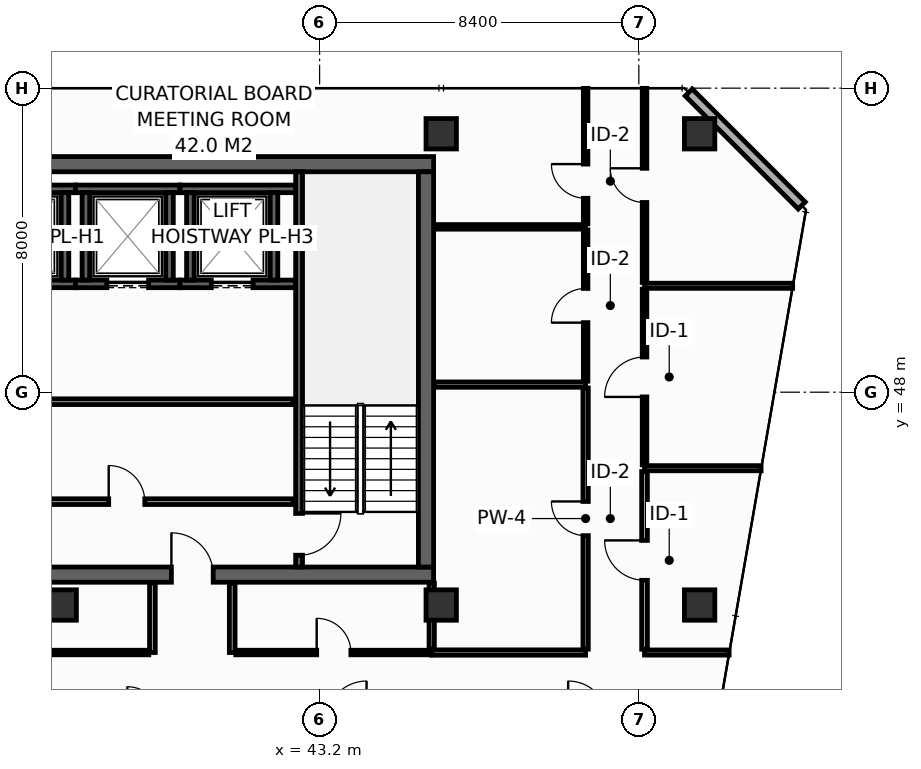
"""IFC4 building model, lengths in metres.
Left out: names, types, materials, properties, quantities, classifications, styles, units other than length and angle.
Written with IfcOpenShell. Run it as: python <this file> out.ifc"""

import sys

from ifc_helpers import new_model, si_unit, direction, frame, frame_2d, origin, origin_2d, place, context, subcontext, project, spatial, rectangle, hollow_rectangle, extrude, element, fill, save


model = new_model("IFC4")
c1 = context("Model", 3, precision=1e-05, world=origin(), true_north=direction((0.0, 1.0)))
c2 = subcontext(c1, "Body", "Model", "MODEL_VIEW")
j1 = project(units=[si_unit("LENGTHUNIT", "METRE"), si_unit("PLANEANGLEUNIT", "RADIAN")], contexts=[c1])
p1 = place(None, origin())
s1 = spatial("IfcSite", under=j1, at=p1, CompositionType="ELEMENT")
p2 = place(p1, origin())
s2 = spatial("IfcBuilding", under=s1, at=p2, CompositionType="ELEMENT")
p3 = place(p2, frame((0.0, 0.0, 242.0)))
s3 = spatial("IfcBuildingStorey", under=s2, at=p3, CompositionType="ELEMENT", Elevation=242.0)
p4 = place(p3, frame((13.7, 43.2, 0.0), z_axis=(0.0, 0.0, 1.0), x_axis=(1.0, 0.0, 0.0)))
e1 = element("IfcWall", 1, at=p4, inside=s3, PredefinedType="SHEAR", context=c2, shape_type="SweptSolid", body=[
    extrude(rectangle(XDim=32.5, YDim=0.4, at=frame_2d((16.25, 0.0))), origin(), (0.0, 0.0, 1.0), 3.55),
])
p5 = place(p4, frame((5.4, 0.0, 0.0)))
e2 = element("IfcOpeningElement", 2, at=p5, cuts=e1, PredefinedType="OPENING", context=c2, shape_type="SweptSolid", body=[
    extrude(rectangle(XDim=1.1, YDim=2.15, at=frame_2d((0.55, 1.075))), frame((0.0, 0.21, 0.0), z_axis=(0.0, -1.0, 0.0), x_axis=(1.0, 0.0, 0.0)), (0.0, 0.0, 1.0), 0.42),
])
p6 = place(p4, frame((25.6, 0.0, 0.0)))
e3 = element("IfcOpeningElement", 3, at=p6, cuts=e1, PredefinedType="OPENING", context=c2, shape_type="SweptSolid", body=[
    extrude(rectangle(XDim=1.1, YDim=2.15, at=frame_2d((0.55, 1.075))), frame((0.0, 0.21, 0.0), z_axis=(0.0, -1.0, 0.0), x_axis=(1.0, 0.0, 0.0)), (0.0, 0.0, 1.0), 0.42),
])
p7 = place(p3, frame((13.7, 54.0, 0.0), z_axis=(0.0, 0.0, 1.0), x_axis=(1.0, 0.0, 0.0)))
e4 = element("IfcWall", 4, at=p7, inside=s3, PredefinedType="SHEAR", context=c2, shape_type="SweptSolid", body=[
    extrude(rectangle(XDim=32.5, YDim=0.4, at=frame_2d((16.25, 0.0))), origin(), (0.0, 0.0, 1.0), 3.55),
])
p8 = place(p3, frame((46.0, 43.4, 0.0), z_axis=(0.0, 0.0, 1.0), x_axis=(0.0, 1.0, 0.0)))
e5 = element("IfcWall", 5, at=p8, inside=s3, PredefinedType="SHEAR", context=c2, shape_type="SweptSolid", body=[
    extrude(rectangle(XDim=10.4, YDim=0.4, at=frame_2d((5.2, 0.0))), origin(), (0.0, 0.0, 1.0), 3.55),
])
for number, where, z_axis, x_axis in (
    (6, (46.4, 54.8, 0.0), (0.0, 0.0, 1.0), (1.0, 0.0, 0.0)),
    (7, (53.2, 54.8, 0.0), (0.0, 0.0, 1.0), (1.0, 0.0, 0.0)),
    (8, (36.4, 42.4, 0.0), (0.0, 0.0, 1.0), (1.0, 0.0, 0.0)),
    (9, (46.4, 42.4, 0.0), (0.0, 0.0, 1.0), (1.0, 0.0, 0.0)),
    (10, (53.2, 42.4, 0.0), (0.0, 0.0, 1.0), (1.0, 0.0, 0.0)),
):
    element("IfcColumn", number, at=place(p3, frame(where, z_axis=z_axis, x_axis=x_axis)), inside=s3, PredefinedType="COLUMN", context=c2, shape_type="SweptSolid", body=[
        extrude(hollow_rectangle(XDim=0.8, YDim=0.8, WallThickness=0.036, at=origin_2d()), origin(), (0.0, 0.0, 1.0), 3.8),
    ])
p9 = place(p3, frame((34.2, 50.85, 0.0), z_axis=(0.0, 0.0, 1.0), x_axis=(1.0, 0.0, 0.0)))
e11 = element("IfcWall", 11, at=p9, inside=s3, PredefinedType="SHEAR", context=c2, shape_type="SweptSolid", body=[
    extrude(rectangle(XDim=2.575, YDim=0.2, at=frame_2d((1.288, 0.0))), origin(), (0.0, 0.0, 1.0), 3.55),
])
p10 = place(p9, frame((0.65, 0.0, 0.0)))
e12 = element("IfcOpeningElement", 12, at=p10, cuts=e11, PredefinedType="OPENING", context=c2, shape_type="SweptSolid", body=[
    extrude(rectangle(XDim=1.1, YDim=2.2, at=frame_2d((0.55, 1.1))), frame((0.0, 0.11, 0.0), z_axis=(0.0, -1.0, 0.0), x_axis=(1.0, 0.0, 0.0)), (0.0, 0.0, 1.0), 0.22),
])
p11 = place(p3, frame((34.2, 53.35, 0.0), z_axis=(0.0, 0.0, 1.0), x_axis=(1.0, 0.0, 0.0)))
e13 = element("IfcWall", 13, at=p11, inside=s3, PredefinedType="SHEAR", context=c2, shape_type="SweptSolid", body=[
    extrude(rectangle(XDim=2.575, YDim=0.2, at=frame_2d((1.288, 0.0))), origin(), (0.0, 0.0, 1.0), 3.55),
])
p12 = place(p3, frame((36.5, 50.95, 0.0), z_axis=(0.0, 0.0, 1.0), x_axis=(0.0, 1.0, 0.0)))
e14 = element("IfcWall", 14, at=p12, inside=s3, PredefinedType="SHEAR", context=c2, shape_type="SweptSolid", body=[
    extrude(rectangle(XDim=2.3, YDim=0.2, at=frame_2d((1.15, 0.0))), origin(), (0.0, 0.0, 1.0), 3.55),
])
p13 = place(p3, frame((36.775, 50.85, 0.0), z_axis=(0.0, 0.0, 1.0), x_axis=(1.0, 0.0, 0.0)))
e15 = element("IfcWall", 15, at=p13, inside=s3, PredefinedType="SHEAR", context=c2, shape_type="SweptSolid", body=[
    extrude(rectangle(XDim=2.75, YDim=0.2, at=frame_2d((1.375, 0.0))), origin(), (0.0, 0.0, 1.0), 3.55),
])
p14 = place(p13, frame((0.825, 0.0, 0.0)))
e16 = element("IfcOpeningElement", 16, at=p14, cuts=e15, PredefinedType="OPENING", context=c2, shape_type="SweptSolid", body=[
    extrude(rectangle(XDim=1.1, YDim=2.2, at=frame_2d((0.55, 1.1))), frame((0.0, 0.11, 0.0), z_axis=(0.0, -1.0, 0.0), x_axis=(1.0, 0.0, 0.0)), (0.0, 0.0, 1.0), 0.22),
])
p15 = place(p3, frame((36.775, 53.35, 0.0), z_axis=(0.0, 0.0, 1.0), x_axis=(1.0, 0.0, 0.0)))
e17 = element("IfcWall", 17, at=p15, inside=s3, PredefinedType="SHEAR", context=c2, shape_type="SweptSolid", body=[
    extrude(rectangle(XDim=2.75, YDim=0.2, at=frame_2d((1.375, 0.0))), origin(), (0.0, 0.0, 1.0), 3.55),
])
for number, where, z_axis, x_axis in (
    (18, (37.05, 50.95, 0.0), (0.0, 0.0, 1.0), (0.0, 1.0, 0.0)),
    (19, (39.25, 50.95, 0.0), (0.0, 0.0, 1.0), (0.0, 1.0, 0.0)),
):
    element("IfcWall", number, at=place(p3, frame(where, z_axis=z_axis, x_axis=x_axis)), inside=s3, PredefinedType="SHEAR", context=c2, shape_type="SweptSolid", body=[
        extrude(rectangle(XDim=2.3, YDim=0.2, at=frame_2d((1.15, 0.0))), origin(), (0.0, 0.0, 1.0), 3.55),
    ])
p16 = place(p3, frame((39.525, 50.85, 0.0), z_axis=(0.0, 0.0, 1.0), x_axis=(1.0, 0.0, 0.0)))
e20 = element("IfcWall", 20, at=p16, inside=s3, PredefinedType="SHEAR", context=c2, shape_type="SweptSolid", body=[
    extrude(rectangle(XDim=3.045, YDim=0.2, at=frame_2d((1.522, 0.0))), origin(), (0.0, 0.0, 1.0), 3.55),
])
p17 = place(p16, frame((0.825, 0.0, 0.0)))
e21 = element("IfcOpeningElement", 21, at=p17, cuts=e20, PredefinedType="OPENING", context=c2, shape_type="SweptSolid", body=[
    extrude(rectangle(XDim=1.1, YDim=2.2, at=frame_2d((0.55, 1.1))), frame((0.0, 0.11, 0.0), z_axis=(0.0, -1.0, 0.0), x_axis=(1.0, 0.0, 0.0)), (0.0, 0.0, 1.0), 0.22),
])
p18 = place(p3, frame((39.525, 53.35, 0.0), z_axis=(0.0, 0.0, 1.0), x_axis=(1.0, 0.0, 0.0)))
e22 = element("IfcWall", 22, at=p18, inside=s3, PredefinedType="SHEAR", context=c2, shape_type="SweptSolid", body=[
    extrude(rectangle(XDim=3.045, YDim=0.2, at=frame_2d((1.522, 0.0))), origin(), (0.0, 0.0, 1.0), 3.55),
])
for number, where, z_axis, x_axis in (
    (23, (39.8, 50.95, 0.0), (0.0, 0.0, 1.0), (0.0, 1.0, 0.0)),
    (24, (42.0, 50.95, 0.0), (0.0, 0.0, 1.0), (0.0, 1.0, 0.0)),
):
    element("IfcWall", number, at=place(p3, frame(where, z_axis=z_axis, x_axis=x_axis)), inside=s3, PredefinedType="SHEAR", context=c2, shape_type="SweptSolid", body=[
        extrude(rectangle(XDim=2.3, YDim=0.2, at=frame_2d((1.15, 0.0))), origin(), (0.0, 0.0, 1.0), 3.55),
    ])
p19 = place(p3, frame((42.66, 53.8, 0.0), z_axis=(0.0, 0.0, 1.0), x_axis=(0.0, -1.0, 0.0)))
e25 = element("IfcWall", 25, at=p19, inside=s3, PredefinedType="SHEAR", context=c2, shape_type="SweptSolid", body=[
    extrude(rectangle(XDim=10.4, YDim=0.18, at=frame_2d((5.2, 0.0))), origin(), (0.0, 0.0, 1.0), 3.55),
])
p20 = place(p19, frame((8.99, 0.0, 0.0)))
e26 = element("IfcOpeningElement", 26, at=p20, cuts=e25, PredefinedType="OPENING", context=c2, shape_type="SweptSolid", body=[
    extrude(rectangle(XDim=1.1, YDim=2.15, at=frame_2d((0.55, 1.075))), frame((0.0, 0.1, 0.0), z_axis=(0.0, -1.0, 0.0), x_axis=(1.0, 0.0, 0.0)), (0.0, 0.0, 1.0), 0.2),
])
p21 = place(p3, frame((34.05, 45.12, 0.0), z_axis=(0.0, 0.0, 1.0), x_axis=(1.0, 0.0, 0.0)))
e27 = element("IfcWall", 27, at=p21, inside=s3, PredefinedType="PARTITIONING", context=c2, shape_type="SweptSolid", body=[
    extrude(rectangle(XDim=8.45, YDim=0.15, at=frame_2d((4.225, 0.0))), origin(), (0.0, 0.0, 1.0), 3.55),
])
p22 = place(p21, frame((3.6, 0.0, 0.0)))
e28 = element("IfcOpeningElement", 28, at=p22, cuts=e27, PredefinedType="OPENING", context=c2, shape_type="SweptSolid", body=[
    extrude(rectangle(XDim=0.95, YDim=2.15, at=frame_2d((0.475, 1.075))), frame((0.0, 0.085, 0.0), z_axis=(0.0, -1.0, 0.0), x_axis=(1.0, 0.0, 0.0)), (0.0, 0.0, 1.0), 0.17),
])
p23 = place(p3, frame((34.05, 47.75, 0.0), z_axis=(0.0, 0.0, 1.0), x_axis=(1.0, 0.0, 0.0)))
e29 = element("IfcWall", 29, at=p23, inside=s3, PredefinedType="PARTITIONING", context=c2, shape_type="SweptSolid", body=[
    extrude(rectangle(XDim=8.45, YDim=0.15, at=frame_2d((4.225, 0.0))), origin(), (0.0, 0.0, 1.0), 3.55),
])
p24 = place(p3, frame((55.887, 52.913, 0.0), z_axis=(0.0, 0.0, 1.0), x_axis=(-0.707106781187, 0.707106781187, 0.0)))
e30 = element("IfcWall", 30, at=p24, inside=s3, PredefinedType="STANDARD", context=c2, shape_type="SweptSolid", body=[
    extrude(rectangle(XDim=4.206, YDim=0.26, at=frame_2d((2.103, 0.0))), origin(), (0.0, 0.0, 1.0), 3.55),
])
p25 = place(p3, frame((46.15, 41.15, 0.0), z_axis=(0.0, 0.0, 1.0), x_axis=(1.0, 0.0, 0.0)))
e31 = element("IfcWall", 31, at=p25, inside=s3, PredefinedType="PARTITIONING", context=c2, shape_type="SweptSolid", body=[
    extrude(rectangle(XDim=4.05, YDim=0.14, at=frame_2d((2.025, 0.0))), origin(), (0.0, 0.0, 1.0), 3.55),
])
p26 = place(p3, frame((46.15, 41.24, 0.0), z_axis=(0.0, 0.0, 1.0), x_axis=(0.0, 1.0, 0.0)))
e32 = element("IfcWall", 32, at=p26, inside=s3, PredefinedType="PARTITIONING", context=c2, shape_type="SweptSolid", body=[
    extrude(rectangle(XDim=1.74, YDim=0.14, at=frame_2d((0.87, 0.0))), origin(), (0.0, 0.0, 1.0), 3.55),
])
p27 = place(p3, frame((46.22, 48.2, 0.0), z_axis=(0.0, 0.0, 1.0), x_axis=(1.0, 0.0, 0.0)))
e33 = element("IfcWall", 33, at=p27, inside=s3, PredefinedType="PARTITIONING", context=c2, shape_type="SweptSolid", body=[
    extrude(rectangle(XDim=3.98, YDim=0.14, at=frame_2d((1.99, 0.0))), origin(), (0.0, 0.0, 1.0), 3.55),
])
p28 = place(p3, frame((50.2, 41.24, 0.0), z_axis=(0.0, 0.0, 1.0), x_axis=(0.0, 1.0, 0.0)))
e34 = element("IfcWall", 34, at=p28, inside=s3, PredefinedType="PARTITIONING", context=c2, shape_type="SweptSolid", body=[
    extrude(rectangle(XDim=6.87, YDim=0.14, at=frame_2d((3.435, 0.0))), origin(), (0.0, 0.0, 1.0), 2.947),
])
p29 = place(p28, frame((2.985, 0.0, 0.0)))
e35 = element("IfcOpeningElement", 35, at=p29, cuts=e34, PredefinedType="OPENING", context=c2, shape_type="SweptSolid", body=[
    extrude(rectangle(XDim=0.9, YDim=2.1, at=frame_2d((0.45, 1.05))), frame((0.0, 0.08, 0.0), z_axis=(0.0, -1.0, 0.0), x_axis=(1.0, 0.0, 0.0)), (0.0, 0.0, 1.0), 0.16),
])
p30 = place(p3, frame((46.22, 52.35, 0.0), z_axis=(0.0, 0.0, 1.0), x_axis=(1.0, 0.0, 0.0)))
e36 = element("IfcWall", 36, at=p30, inside=s3, PredefinedType="PARTITIONING", context=c2, shape_type="SweptSolid", body=[
    extrude(rectangle(XDim=3.98, YDim=0.12, at=frame_2d((1.99, 0.0))), origin(), (0.0, 0.0, 1.0), 3.55),
])
p31 = place(p3, frame((50.2, 48.29, 0.0), z_axis=(0.0, 0.0, 1.0), x_axis=(0.0, 1.0, 0.0)))
e37 = element("IfcWall", 37, at=p31, inside=s3, PredefinedType="PARTITIONING", context=c2, shape_type="SweptSolid", body=[
    extrude(rectangle(XDim=3.98, YDim=0.12, at=frame_2d((1.99, 0.0))), origin(), (0.0, 0.0, 1.0), 3.55),
])
p32 = place(p31, frame((1.54, 0.0, 0.0)))
e38 = element("IfcOpeningElement", 38, at=p32, cuts=e37, PredefinedType="OPENING", context=c2, shape_type="SweptSolid", body=[
    extrude(rectangle(XDim=0.9, YDim=2.1, at=frame_2d((0.45, 1.05))), frame((0.0, 0.07, 0.0), z_axis=(0.0, -1.0, 0.0), x_axis=(1.0, 0.0, 0.0)), (0.0, 0.0, 1.0), 0.14),
])
p33 = place(p3, frame((50.2, 52.43, 0.0), z_axis=(0.0, 0.0, 1.0), x_axis=(0.0, 1.0, 0.0)))
e39 = element("IfcWall", 39, at=p33, inside=s3, PredefinedType="PARTITIONING", context=c2, shape_type="SweptSolid", body=[
    extrude(rectangle(XDim=3.565, YDim=0.12, at=frame_2d((1.783, 0.0))), origin(), (0.0, 0.0, 1.0), 2.935),
])
p34 = place(p33, frame((0.672, 0.0, 0.0)))
e40 = element("IfcOpeningElement", 40, at=p34, cuts=e39, PredefinedType="OPENING", context=c2, shape_type="SweptSolid", body=[
    extrude(rectangle(XDim=0.9, YDim=2.1, at=frame_2d((0.45, 1.05))), frame((0.0, 0.07, 0.0), z_axis=(0.0, -1.0, 0.0), x_axis=(1.0, 0.0, 0.0)), (0.0, 0.0, 1.0), 0.14),
])
p35 = place(p3, frame((51.75, 41.15, 0.0), z_axis=(0.0, 0.0, 1.0), x_axis=(1.0, 0.0, 0.0)))
e41 = element("IfcWall", 41, at=p35, inside=s3, PredefinedType="PARTITIONING", context=c2, shape_type="SweptSolid", body=[
    extrude(rectangle(XDim=2.226, YDim=0.135, at=frame_2d((1.113, 0.0))), origin(), (0.0, 0.0, 1.0), 3.085),
])
p36 = place(p3, frame((51.75, 46.0, 0.0), z_axis=(0.0, 0.0, 1.0), x_axis=(1.0, 0.0, 0.0)))
e42 = element("IfcWall", 42, at=p36, inside=s3, PredefinedType="PARTITIONING", context=c2, shape_type="SweptSolid", body=[
    extrude(rectangle(XDim=3.066, YDim=0.135, at=frame_2d((1.533, 0.0))), origin(), (0.0, 0.0, 1.0), 2.947),
])
p37 = place(p3, frame((51.75, 50.8, 0.0), z_axis=(0.0, 0.0, 1.0), x_axis=(1.0, 0.0, 0.0)))
e43 = element("IfcWall", 43, at=p37, inside=s3, PredefinedType="PARTITIONING", context=c2, shape_type="SweptSolid", body=[
    extrude(rectangle(XDim=3.898, YDim=0.135, at=frame_2d((1.949, 0.0))), origin(), (0.0, 0.0, 1.0), 2.947),
])
p38 = place(p3, frame((51.75, 41.238, 0.0), z_axis=(0.0, 0.0, 1.0), x_axis=(0.0, 1.0, 0.0)))
e44 = element("IfcWall", 44, at=p38, inside=s3, PredefinedType="PARTITIONING", context=c2, shape_type="SweptSolid", body=[
    extrude(rectangle(XDim=4.675, YDim=0.15, at=frame_2d((2.337, 0.0))), origin(), (0.0, 0.0, 1.0), 2.947),
])
p39 = place(p38, frame((1.813, 0.0, 0.0)))
e45 = element("IfcOpeningElement", 45, at=p39, cuts=e44, PredefinedType="OPENING", context=c2, shape_type="SweptSolid", body=[
    extrude(rectangle(XDim=1.05, YDim=2.15, at=frame_2d((0.525, 1.075))), frame((0.0, 0.085, 0.0), z_axis=(0.0, -1.0, 0.0), x_axis=(1.0, 0.0, 0.0)), (0.0, 0.0, 1.0), 0.17),
])
p40 = place(p3, frame((51.75, 46.087, 0.0), z_axis=(0.0, 0.0, 1.0), x_axis=(0.0, 1.0, 0.0)))
e46 = element("IfcWall", 46, at=p40, inside=s3, PredefinedType="PARTITIONING", context=c2, shape_type="SweptSolid", body=[
    extrude(rectangle(XDim=4.625, YDim=0.12, at=frame_2d((2.312, 0.0))), origin(), (0.0, 0.0, 1.0), 3.55),
])
p41 = place(p40, frame((1.788, 0.0, 0.0)))
e47 = element("IfcOpeningElement", 47, at=p41, cuts=e46, PredefinedType="OPENING", context=c2, shape_type="SweptSolid", body=[
    extrude(rectangle(XDim=1.05, YDim=2.15, at=frame_2d((0.525, 1.075))), frame((0.0, 0.07, 0.0), z_axis=(0.0, -1.0, 0.0), x_axis=(1.0, 0.0, 0.0)), (0.0, 0.0, 1.0), 0.14),
])
p42 = place(p3, frame((51.75, 50.887, 0.0), z_axis=(0.0, 0.0, 1.0), x_axis=(0.0, 1.0, 0.0)))
e48 = element("IfcWall", 48, at=p42, inside=s3, PredefinedType="PARTITIONING", context=c2, shape_type="SweptSolid", body=[
    extrude(rectangle(XDim=5.108, YDim=0.12, at=frame_2d((2.554, 0.0))), origin(), (0.0, 0.0, 1.0), 2.935),
])
p43 = place(p42, frame((2.104, 0.0, 0.0)))
e49 = element("IfcOpeningElement", 49, at=p43, cuts=e48, PredefinedType="OPENING", context=c2, shape_type="SweptSolid", body=[
    extrude(rectangle(XDim=0.9, YDim=2.1, at=frame_2d((0.45, 1.05))), frame((0.0, 0.07, 0.0), z_axis=(0.0, -1.0, 0.0), x_axis=(1.0, 0.0, 0.0)), (0.0, 0.0, 1.0), 0.14),
])
for number, where, z_axis, x_axis in (
    (50, (38.8, 41.15, 0.0), (0.0, 0.0, 1.0), (0.0, 1.0, 0.0)),
    (51, (40.9, 41.15, 0.0), (0.0, 0.0, 1.0), (0.0, 1.0, 0.0)),
):
    element("IfcWall", number, at=place(p3, frame(where, z_axis=z_axis, x_axis=x_axis)), inside=s3, PredefinedType="PARTITIONING", context=c2, shape_type="SweptSolid", body=[
        extrude(rectangle(XDim=1.83, YDim=0.15, at=frame_2d((0.915, 0.0))), origin(), (0.0, 0.0, 1.0), 3.55),
    ])
p44 = place(p3, frame((20.795, 41.15, 0.0), z_axis=(0.0, 0.0, 1.0), x_axis=(1.0, 0.0, 0.0)))
e52 = element("IfcWall", 52, at=p44, inside=s3, PredefinedType="PARTITIONING", context=c2, shape_type="SweptSolid", body=[
    extrude(rectangle(XDim=17.91, YDim=0.12, at=frame_2d((8.955, 0.0))), origin(), (0.0, 0.0, 1.0), 2.947),
])
p45 = place(p44, frame((8.505, 0.0, 0.0)))
e53 = element("IfcOpeningElement", 53, at=p45, cuts=e52, PredefinedType="OPENING", context=c2, shape_type="SweptSolid", body=[
    extrude(rectangle(XDim=0.9, YDim=2.1, at=frame_2d((0.45, 1.05))), frame((0.0, 0.07, 0.0), z_axis=(0.0, -1.0, 0.0), x_axis=(1.0, 0.0, 0.0)), (0.0, 0.0, 1.0), 0.14),
])
p46 = place(p3, frame((40.995, 41.15, 0.0), z_axis=(0.0, 0.0, 1.0), x_axis=(1.0, 0.0, 0.0)))
e54 = element("IfcWall", 54, at=p46, inside=s3, PredefinedType="PARTITIONING", context=c2, shape_type="SweptSolid", body=[
    extrude(rectangle(XDim=5.155, YDim=0.12, at=frame_2d((2.577, 0.0))), origin(), (0.0, 0.0, 1.0), 3.55),
])
p47 = place(p46, frame((2.128, 0.0, 0.0)))
e55 = element("IfcOpeningElement", 55, at=p47, cuts=e54, PredefinedType="OPENING", context=c2, shape_type="SweptSolid", body=[
    extrude(rectangle(XDim=0.9, YDim=2.1, at=frame_2d((0.45, 1.05))), frame((0.0, 0.07, 0.0), z_axis=(0.0, -1.0, 0.0), x_axis=(1.0, 0.0, 0.0)), (0.0, 0.0, 1.0), 0.14),
])
p48 = place(p14, origin())
e56 = element("IfcDoor", 56, at=p48, inside=s3, OperationType="SLIDING_TO_LEFT", PredefinedType="DOOR", context=c2, shape_type="SweptSolid", body=[
    extrude(rectangle(XDim=1.1, YDim=2.2, at=frame_2d((0.55, 1.1))), frame((0.0, 0.025, 0.0), z_axis=(0.0, -1.0, 0.0), x_axis=(1.0, 0.0, 0.0)), (0.0, 0.0, 1.0), 0.05),
])
fill(e16, e56)
p49 = place(p17, origin())
e57 = element("IfcDoor", 57, at=p49, inside=s3, OperationType="SLIDING_TO_LEFT", PredefinedType="DOOR", context=c2, shape_type="SweptSolid", body=[
    extrude(rectangle(XDim=1.1, YDim=2.2, at=frame_2d((0.55, 1.1))), frame((0.0, 0.025, 0.0), z_axis=(0.0, -1.0, 0.0), x_axis=(1.0, 0.0, 0.0)), (0.0, 0.0, 1.0), 0.05),
])
fill(e21, e57)
p50 = place(p20, origin())
e58 = element("IfcDoor", 58, at=p50, inside=s3, OperationType="SINGLE_SWING_LEFT", PredefinedType="DOOR", context=c2, shape_type="SweptSolid", body=[
    extrude(rectangle(XDim=1.1, YDim=2.15, at=frame_2d((0.55, 1.075))), frame((0.0, 0.025, 0.0), z_axis=(0.0, -1.0, 0.0), x_axis=(1.0, 0.0, 0.0)), (0.0, 0.0, 1.0), 0.05),
])
fill(e26, e58)
p51 = place(p6, origin())
e59 = element("IfcDoor", 59, at=p51, inside=s3, OperationType="SINGLE_SWING_LEFT", PredefinedType="DOOR", context=c2, shape_type="SweptSolid", body=[
    extrude(rectangle(XDim=1.1, YDim=2.15, at=frame_2d((0.55, 1.075))), frame((0.0, 0.025, 0.0), z_axis=(0.0, -1.0, 0.0), x_axis=(1.0, 0.0, 0.0)), (0.0, 0.0, 1.0), 0.05),
])
fill(e3, e59)
p52 = place(p22, origin())
e60 = element("IfcDoor", 60, at=p52, inside=s3, OperationType="SINGLE_SWING_LEFT", PredefinedType="DOOR", context=c2, shape_type="SweptSolid", body=[
    extrude(rectangle(XDim=0.95, YDim=2.15, at=frame_2d((0.475, 1.075))), frame((0.0, 0.025, 0.0), z_axis=(0.0, -1.0, 0.0), x_axis=(1.0, 0.0, 0.0)), (0.0, 0.0, 1.0), 0.05),
])
fill(e28, e60)
p53 = place(p29, origin())
e61 = element("IfcDoor", 61, at=p53, inside=s3, OperationType="SINGLE_SWING_RIGHT", PredefinedType="DOOR", context=c2, shape_type="SweptSolid", body=[
    extrude(rectangle(XDim=0.9, YDim=2.1, at=frame_2d((0.45, 1.05))), frame((0.0, 0.025, 0.0), z_axis=(0.0, -1.0, 0.0), x_axis=(1.0, 0.0, 0.0)), (0.0, 0.0, 1.0), 0.05),
])
fill(e35, e61)
p54 = place(p32, origin())
e62 = element("IfcDoor", 62, at=p54, inside=s3, OperationType="SINGLE_SWING_LEFT", PredefinedType="DOOR", context=c2, shape_type="SweptSolid", body=[
    extrude(rectangle(XDim=0.9, YDim=2.1, at=frame_2d((0.45, 1.05))), frame((0.0, 0.025, 0.0), z_axis=(0.0, -1.0, 0.0), x_axis=(1.0, 0.0, 0.0)), (0.0, 0.0, 1.0), 0.05),
])
fill(e38, e62)
p55 = place(p34, origin())
e63 = element("IfcDoor", 63, at=p55, inside=s3, OperationType="SINGLE_SWING_RIGHT", PredefinedType="DOOR", context=c2, shape_type="SweptSolid", body=[
    extrude(rectangle(XDim=0.9, YDim=2.1, at=frame_2d((0.45, 1.05))), frame((0.0, 0.025, 0.0), z_axis=(0.0, -1.0, 0.0), x_axis=(1.0, 0.0, 0.0)), (0.0, 0.0, 1.0), 0.05),
])
fill(e40, e63)
p56 = place(p39, origin())
e64 = element("IfcDoor", 64, at=p56, inside=s3, OperationType="SINGLE_SWING_RIGHT", PredefinedType="DOOR", context=c2, shape_type="SweptSolid", body=[
    extrude(rectangle(XDim=1.05, YDim=2.15, at=frame_2d((0.525, 1.075))), frame((0.0, 0.025, 0.0), z_axis=(0.0, -1.0, 0.0), x_axis=(1.0, 0.0, 0.0)), (0.0, 0.0, 1.0), 0.05),
])
fill(e45, e64)
p57 = place(p41, origin())
e65 = element("IfcDoor", 65, at=p57, inside=s3, OperationType="SINGLE_SWING_LEFT", PredefinedType="DOOR", context=c2, shape_type="SweptSolid", body=[
    extrude(rectangle(XDim=1.05, YDim=2.15, at=frame_2d((0.525, 1.075))), frame((0.0, 0.025, 0.0), z_axis=(0.0, -1.0, 0.0), x_axis=(1.0, 0.0, 0.0)), (0.0, 0.0, 1.0), 0.05),
])
fill(e47, e65)
p58 = place(p43, origin())
e66 = element("IfcDoor", 66, at=p58, inside=s3, OperationType="SINGLE_SWING_RIGHT", PredefinedType="DOOR", context=c2, shape_type="SweptSolid", body=[
    extrude(rectangle(XDim=0.9, YDim=2.1, at=frame_2d((0.45, 1.05))), frame((0.0, 0.025, 0.0), z_axis=(0.0, -1.0, 0.0), x_axis=(1.0, 0.0, 0.0)), (0.0, 0.0, 1.0), 0.05),
])
fill(e49, e66)
p59 = place(p47, origin())
e67 = element("IfcDoor", 67, at=p59, inside=s3, OperationType="SINGLE_SWING_LEFT", PredefinedType="DOOR", context=c2, shape_type="SweptSolid", body=[
    extrude(rectangle(XDim=0.9, YDim=2.1, at=frame_2d((0.45, 1.05))), frame((0.0, 0.025, 0.0), z_axis=(0.0, -1.0, 0.0), x_axis=(1.0, 0.0, 0.0)), (0.0, 0.0, 1.0), 0.05),
])
fill(e55, e67)
save(model, sys.argv[1])
